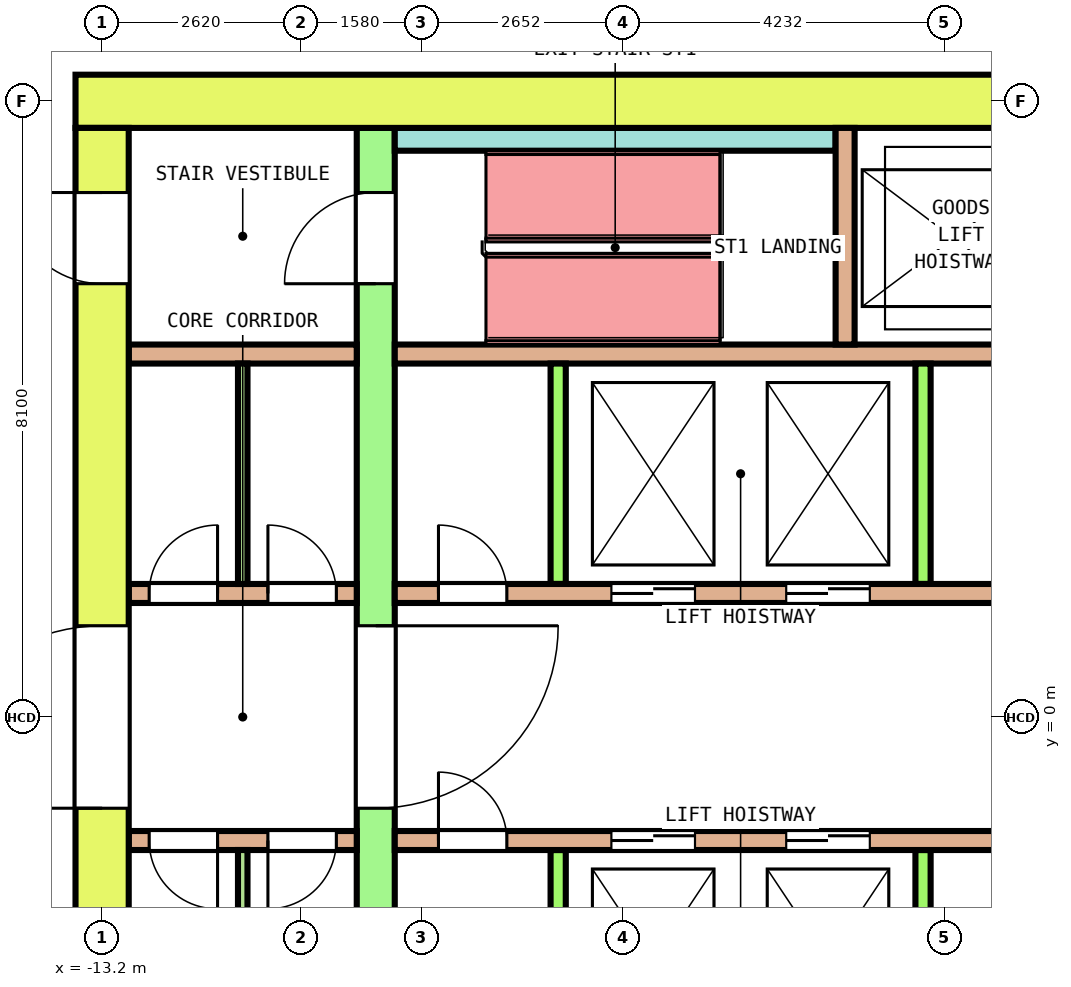
"""IFC4 building model, lengths in metres.
Left out: names, types, materials, properties, quantities, classifications, styles, units other than length and angle.
Written with IfcOpenShell. Run it as: python <this file> out.ifc"""

import sys

from ifc_helpers import new_model, si_unit, direction, frame, frame_2d, origin, place, context, subcontext, project, spatial, rectangle, extrude, element, fill, save


model = new_model("IFC4")
c1 = context("Model", 3, precision=1e-05, world=origin(), true_north=direction((0.0, 1.0)))
c2 = subcontext(c1, "Body", "Model", "MODEL_VIEW")
j1 = project(units=[si_unit("LENGTHUNIT", "METRE"), si_unit("PLANEANGLEUNIT", "RADIAN")], contexts=[c1])
p1 = place(None, origin())
s1 = spatial("IfcSite", under=j1, at=p1, CompositionType="ELEMENT")
p2 = place(p1, origin())
s2 = spatial("IfcBuilding", under=s1, at=p2, CompositionType="ELEMENT")
p3 = place(p2, frame((0.0, 0.0, 145.2)))
s3 = spatial("IfcBuildingStorey", under=s2, at=p3, CompositionType="ELEMENT", Elevation=145.2)
p4 = place(p3, frame((-13.55, 8.1, 0.0), z_axis=(0.0, 0.0, 1.0), x_axis=(1.0, 0.0, 0.0)))
e1 = element("IfcWall", 1, at=p4, inside=s3, PredefinedType="SHEAR", context=c2, shape_type="SweptSolid", body=[
    extrude(rectangle(XDim=27.1, YDim=0.7, at=frame_2d((13.55, 0.0))), origin(), (0.0, 0.0, 1.0), 4.1),
])
p5 = place(p4, frame((14.475, 0.0, 0.0)))
e2 = element("IfcOpeningElement", 2, at=p5, cuts=e1, PredefinedType="OPENING", context=c2, shape_type="SweptSolid", body=[
    extrude(rectangle(XDim=1.4, YDim=2.1, at=frame_2d((0.7, 1.05))), frame((0.0, 0.36, 0.0), z_axis=(0.0, -1.0, 0.0), x_axis=(1.0, 0.0, 0.0)), (0.0, 0.0, 1.0), 0.72),
])
p6 = place(p3, frame((-13.2, -7.75, 0.0), z_axis=(0.0, 0.0, 1.0), x_axis=(0.0, 1.0, 0.0)))
e3 = element("IfcWall", 3, at=p6, inside=s3, PredefinedType="SHEAR", context=c2, shape_type="SweptSolid", body=[
    extrude(rectangle(XDim=15.5, YDim=0.7, at=frame_2d((7.75, 0.0))), origin(), (0.0, 0.0, 1.0), 4.1),
])
p7 = place(p6, frame((6.55, 0.0, 0.0)))
e4 = element("IfcOpeningElement", 4, at=p7, cuts=e3, PredefinedType="OPENING", context=c2, shape_type="SweptSolid", body=[
    extrude(rectangle(XDim=2.4, YDim=2.1, at=frame_2d((1.2, 1.05))), frame((0.0, 0.36, 0.0), z_axis=(0.0, -1.0, 0.0), x_axis=(1.0, 0.0, 0.0)), (0.0, 0.0, 1.0), 0.72),
])
p8 = place(p6, frame((13.45, 0.0, 0.0)))
e5 = element("IfcOpeningElement", 5, at=p8, cuts=e3, PredefinedType="OPENING", context=c2, shape_type="SweptSolid", body=[
    extrude(rectangle(XDim=1.2, YDim=2.1, at=frame_2d((0.6, 1.05))), frame((0.0, 0.36, 0.0), z_axis=(0.0, -1.0, 0.0), x_axis=(1.0, 0.0, 0.0)), (0.0, 0.0, 1.0), 0.72),
])
p9 = place(p6, frame((0.85, 0.0, 0.0)))
e6 = element("IfcOpeningElement", 6, at=p9, cuts=e3, PredefinedType="OPENING", context=c2, shape_type="SweptSolid", body=[
    extrude(rectangle(XDim=1.2, YDim=2.1, at=frame_2d((0.6, 1.05))), frame((0.0, 0.36, 0.0), z_axis=(0.0, -1.0, 0.0), x_axis=(1.0, 0.0, 0.0)), (0.0, 0.0, 1.0), 0.72),
])
p10 = place(p3, frame((-9.6, -7.75, 0.0), z_axis=(0.0, 0.0, 1.0), x_axis=(0.0, 1.0, 0.0)))
e7 = element("IfcWall", 7, at=p10, inside=s3, PredefinedType="SHEAR", context=c2, shape_type="SweptSolid", body=[
    extrude(rectangle(XDim=15.5, YDim=0.5, at=frame_2d((7.75, 0.0))), origin(), (0.0, 0.0, 1.0), 4.1),
])
p11 = place(p10, frame((6.55, 0.0, 0.0)))
e8 = element("IfcOpeningElement", 8, at=p11, cuts=e7, PredefinedType="OPENING", context=c2, shape_type="SweptSolid", body=[
    extrude(rectangle(XDim=2.4, YDim=2.1, at=frame_2d((1.2, 1.05))), frame((0.0, 0.26, 0.0), z_axis=(0.0, -1.0, 0.0), x_axis=(1.0, 0.0, 0.0)), (0.0, 0.0, 1.0), 0.52),
])
p12 = place(p10, frame((13.45, 0.0, 0.0)))
e9 = element("IfcOpeningElement", 9, at=p12, cuts=e7, PredefinedType="OPENING", context=c2, shape_type="SweptSolid", body=[
    extrude(rectangle(XDim=1.2, YDim=2.1, at=frame_2d((0.6, 1.05))), frame((0.0, 0.26, 0.0), z_axis=(0.0, -1.0, 0.0), x_axis=(1.0, 0.0, 0.0)), (0.0, 0.0, 1.0), 0.52),
])
p13 = place(p10, frame((0.85, 0.0, 0.0)))
e10 = element("IfcOpeningElement", 10, at=p13, cuts=e7, PredefinedType="OPENING", context=c2, shape_type="SweptSolid", body=[
    extrude(rectangle(XDim=1.2, YDim=2.1, at=frame_2d((0.6, 1.05))), frame((0.0, 0.26, 0.0), z_axis=(0.0, -1.0, 0.0), x_axis=(1.0, 0.0, 0.0)), (0.0, 0.0, 1.0), 0.52),
])
p14 = place(p3, frame((-12.85, 1.625, 0.0), z_axis=(0.0, 0.0, 1.0), x_axis=(1.0, 0.0, 0.0)))
e11 = element("IfcWall", 11, at=p14, inside=s3, PredefinedType="SOLIDWALL", context=c2, shape_type="SweptSolid", body=[
    extrude(rectangle(XDim=3.0, YDim=0.25, at=frame_2d((1.5, 0.0))), origin(), (0.0, 0.0, 1.0), 4.1),
])
p15 = place(p14, frame((0.269, 0.0, 0.0)))
e12 = element("IfcOpeningElement", 12, at=p15, cuts=e11, PredefinedType="OPENING", context=c2, shape_type="SweptSolid", body=[
    extrude(rectangle(XDim=0.9, YDim=2.1, at=frame_2d((0.45, 1.05))), frame((0.0, 0.135, 0.0), z_axis=(0.0, -1.0, 0.0), x_axis=(1.0, 0.0, 0.0)), (0.0, 0.0, 1.0), 0.27),
])
p16 = place(p14, frame((1.831, 0.0, 0.0)))
e13 = element("IfcOpeningElement", 13, at=p16, cuts=e11, PredefinedType="OPENING", context=c2, shape_type="SweptSolid", body=[
    extrude(rectangle(XDim=0.9, YDim=2.1, at=frame_2d((0.45, 1.05))), frame((0.0, 0.135, 0.0), z_axis=(0.0, -1.0, 0.0), x_axis=(1.0, 0.0, 0.0)), (0.0, 0.0, 1.0), 0.27),
])
p17 = place(p3, frame((-9.35, 1.625, 0.0), z_axis=(0.0, 0.0, 1.0), x_axis=(1.0, 0.0, 0.0)))
e14 = element("IfcWall", 14, at=p17, inside=s3, PredefinedType="SOLIDWALL", context=c2, shape_type="SweptSolid", body=[
    extrude(rectangle(XDim=18.7, YDim=0.25, at=frame_2d((9.35, 0.0))), origin(), (0.0, 0.0, 1.0), 4.1),
])
p18 = place(p17, frame((2.85, 0.0, 0.0)))
e15 = element("IfcOpeningElement", 15, at=p18, cuts=e14, PredefinedType="OPENING", context=c2, shape_type="SweptSolid", body=[
    extrude(rectangle(XDim=1.1, YDim=2.1, at=frame_2d((0.55, 1.05))), frame((0.0, 0.135, 0.0), z_axis=(0.0, -1.0, 0.0), x_axis=(1.0, 0.0, 0.0)), (0.0, 0.0, 1.0), 0.27),
])
p19 = place(p17, frame((5.15, 0.0, 0.0)))
e16 = element("IfcOpeningElement", 16, at=p19, cuts=e14, PredefinedType="OPENING", context=c2, shape_type="SweptSolid", body=[
    extrude(rectangle(XDim=1.1, YDim=2.1, at=frame_2d((0.55, 1.05))), frame((0.0, 0.135, 0.0), z_axis=(0.0, -1.0, 0.0), x_axis=(1.0, 0.0, 0.0)), (0.0, 0.0, 1.0), 0.27),
])
p20 = place(p17, frame((14.8, 0.0, 0.0)))
e17 = element("IfcOpeningElement", 17, at=p20, cuts=e14, PredefinedType="OPENING", context=c2, shape_type="SweptSolid", body=[
    extrude(rectangle(XDim=1.1, YDim=2.1, at=frame_2d((0.55, 1.05))), frame((0.0, 0.135, 0.0), z_axis=(0.0, -1.0, 0.0), x_axis=(1.0, 0.0, 0.0)), (0.0, 0.0, 1.0), 0.27),
])
p21 = place(p17, frame((0.575, 0.0, 0.0)))
e18 = element("IfcOpeningElement", 18, at=p21, cuts=e14, PredefinedType="OPENING", context=c2, shape_type="SweptSolid", body=[
    extrude(rectangle(XDim=0.9, YDim=2.1, at=frame_2d((0.45, 1.05))), frame((0.0, 0.135, 0.0), z_axis=(0.0, -1.0, 0.0), x_axis=(1.0, 0.0, 0.0)), (0.0, 0.0, 1.0), 0.27),
])
p22 = place(p17, frame((17.225, 0.0, 0.0)))
e19 = element("IfcOpeningElement", 19, at=p22, cuts=e14, PredefinedType="OPENING", context=c2, shape_type="SweptSolid", body=[
    extrude(rectangle(XDim=0.9, YDim=2.1, at=frame_2d((0.45, 1.05))), frame((0.0, 0.135, 0.0), z_axis=(0.0, -1.0, 0.0), x_axis=(1.0, 0.0, 0.0)), (0.0, 0.0, 1.0), 0.27),
])
p23 = place(p3, frame((-12.85, 4.775, 0.0), z_axis=(0.0, 0.0, 1.0), x_axis=(1.0, 0.0, 0.0)))
e20 = element("IfcWall", 20, at=p23, inside=s3, PredefinedType="SOLIDWALL", context=c2, shape_type="SweptSolid", body=[
    extrude(rectangle(XDim=3.0, YDim=0.25, at=frame_2d((1.5, 0.0))), origin(), (0.0, 0.0, 1.0), 4.1),
])
p24 = place(p3, frame((-9.35, 4.775, 0.0), z_axis=(0.0, 0.0, 1.0), x_axis=(1.0, 0.0, 0.0)))
e21 = element("IfcWall", 21, at=p24, inside=s3, PredefinedType="SOLIDWALL", context=c2, shape_type="SweptSolid", body=[
    extrude(rectangle(XDim=18.7, YDim=0.25, at=frame_2d((9.35, 0.0))), origin(), (0.0, 0.0, 1.0), 4.1),
])
for number, where, z_axis, x_axis in (
    (22, (-7.2, 1.75, 0.0), (0.0, 0.0, 1.0), (0.0, 1.0, 0.0)),
    (23, (-2.4, 1.75, 0.0), (0.0, 0.0, 1.0), (0.0, 1.0, 0.0)),
):
    element("IfcWall", number, at=place(p3, frame(where, z_axis=z_axis, x_axis=x_axis)), inside=s3, PredefinedType="SOLIDWALL", context=c2, shape_type="SweptSolid", body=[
        extrude(rectangle(XDim=2.9, YDim=0.2, at=frame_2d((1.45, 0.0))), origin(), (0.0, 0.0, 1.0), 4.1),
    ])
p25 = place(p3, frame((-12.85, -1.625, 0.0), z_axis=(0.0, 0.0, 1.0), x_axis=(1.0, 0.0, 0.0)))
e24 = element("IfcWall", 24, at=p25, inside=s3, PredefinedType="SOLIDWALL", context=c2, shape_type="SweptSolid", body=[
    extrude(rectangle(XDim=3.0, YDim=0.25, at=frame_2d((1.5, 0.0))), origin(), (0.0, 0.0, 1.0), 4.1),
])
p26 = place(p25, frame((0.269, 0.0, 0.0)))
e25 = element("IfcOpeningElement", 25, at=p26, cuts=e24, PredefinedType="OPENING", context=c2, shape_type="SweptSolid", body=[
    extrude(rectangle(XDim=0.9, YDim=2.1, at=frame_2d((0.45, 1.05))), frame((0.0, 0.135, 0.0), z_axis=(0.0, -1.0, 0.0), x_axis=(1.0, 0.0, 0.0)), (0.0, 0.0, 1.0), 0.27),
])
p27 = place(p25, frame((1.831, 0.0, 0.0)))
e26 = element("IfcOpeningElement", 26, at=p27, cuts=e24, PredefinedType="OPENING", context=c2, shape_type="SweptSolid", body=[
    extrude(rectangle(XDim=0.9, YDim=2.1, at=frame_2d((0.45, 1.05))), frame((0.0, 0.135, 0.0), z_axis=(0.0, -1.0, 0.0), x_axis=(1.0, 0.0, 0.0)), (0.0, 0.0, 1.0), 0.27),
])
p28 = place(p3, frame((-9.35, -1.625, 0.0), z_axis=(0.0, 0.0, 1.0), x_axis=(1.0, 0.0, 0.0)))
e27 = element("IfcWall", 27, at=p28, inside=s3, PredefinedType="SOLIDWALL", context=c2, shape_type="SweptSolid", body=[
    extrude(rectangle(XDim=18.7, YDim=0.25, at=frame_2d((9.35, 0.0))), origin(), (0.0, 0.0, 1.0), 4.1),
])
p29 = place(p28, frame((2.85, 0.0, 0.0)))
e28 = element("IfcOpeningElement", 28, at=p29, cuts=e27, PredefinedType="OPENING", context=c2, shape_type="SweptSolid", body=[
    extrude(rectangle(XDim=1.1, YDim=2.1, at=frame_2d((0.55, 1.05))), frame((0.0, 0.135, 0.0), z_axis=(0.0, -1.0, 0.0), x_axis=(1.0, 0.0, 0.0)), (0.0, 0.0, 1.0), 0.27),
])
p30 = place(p28, frame((5.15, 0.0, 0.0)))
e29 = element("IfcOpeningElement", 29, at=p30, cuts=e27, PredefinedType="OPENING", context=c2, shape_type="SweptSolid", body=[
    extrude(rectangle(XDim=1.1, YDim=2.1, at=frame_2d((0.55, 1.05))), frame((0.0, 0.135, 0.0), z_axis=(0.0, -1.0, 0.0), x_axis=(1.0, 0.0, 0.0)), (0.0, 0.0, 1.0), 0.27),
])
p31 = place(p28, frame((14.8, 0.0, 0.0)))
e30 = element("IfcOpeningElement", 30, at=p31, cuts=e27, PredefinedType="OPENING", context=c2, shape_type="SweptSolid", body=[
    extrude(rectangle(XDim=1.1, YDim=2.1, at=frame_2d((0.55, 1.05))), frame((0.0, 0.135, 0.0), z_axis=(0.0, -1.0, 0.0), x_axis=(1.0, 0.0, 0.0)), (0.0, 0.0, 1.0), 0.27),
])
p32 = place(p28, frame((0.575, 0.0, 0.0)))
e31 = element("IfcOpeningElement", 31, at=p32, cuts=e27, PredefinedType="OPENING", context=c2, shape_type="SweptSolid", body=[
    extrude(rectangle(XDim=0.9, YDim=2.1, at=frame_2d((0.45, 1.05))), frame((0.0, 0.135, 0.0), z_axis=(0.0, -1.0, 0.0), x_axis=(1.0, 0.0, 0.0)), (0.0, 0.0, 1.0), 0.27),
])
p33 = place(p28, frame((17.225, 0.0, 0.0)))
e32 = element("IfcOpeningElement", 32, at=p33, cuts=e27, PredefinedType="OPENING", context=c2, shape_type="SweptSolid", body=[
    extrude(rectangle(XDim=0.9, YDim=2.1, at=frame_2d((0.45, 1.05))), frame((0.0, 0.135, 0.0), z_axis=(0.0, -1.0, 0.0), x_axis=(1.0, 0.0, 0.0)), (0.0, 0.0, 1.0), 0.27),
])
for number, where, z_axis, x_axis in (
    (33, (-7.2, -4.65, 0.0), (0.0, 0.0, 1.0), (0.0, 1.0, 0.0)),
    (34, (-2.4, -4.65, 0.0), (0.0, 0.0, 1.0), (0.0, 1.0, 0.0)),
):
    element("IfcWall", number, at=place(p3, frame(where, z_axis=z_axis, x_axis=x_axis)), inside=s3, PredefinedType="SOLIDWALL", context=c2, shape_type="SweptSolid", body=[
        extrude(rectangle(XDim=2.9, YDim=0.2, at=frame_2d((1.45, 0.0))), origin(), (0.0, 0.0, 1.0), 4.1),
    ])
p34 = place(p3, frame((-9.35, 7.6, 0.0), z_axis=(0.0, 0.0, 1.0), x_axis=(1.0, 0.0, 0.0)))
e35 = element("IfcWall", 35, at=p34, inside=s3, PredefinedType="SOLIDWALL", context=c2, shape_type="SweptSolid", body=[
    extrude(rectangle(XDim=5.8, YDim=0.3, at=frame_2d((2.9, 0.0))), origin(), (0.0, 0.0, 1.0), 4.1),
])
p35 = place(p3, frame((-3.425, 4.9, 0.0), z_axis=(0.0, 0.0, 1.0), x_axis=(0.0, 1.0, 0.0)))
e36 = element("IfcWall", 36, at=p35, inside=s3, PredefinedType="SOLIDWALL", context=c2, shape_type="SweptSolid", body=[
    extrude(rectangle(XDim=2.85, YDim=0.25, at=frame_2d((1.425, 0.0))), origin(), (0.0, 0.0, 1.0), 4.1),
])
for number, where, z_axis, x_axis in (
    (37, (-11.35, 1.75, 0.0), (0.0, 0.0, 1.0), (0.0, 1.0, 0.0)),
    (38, (-11.35, -4.65, 0.0), (0.0, 0.0, 1.0), (0.0, 1.0, 0.0)),
):
    element("IfcWall", number, at=place(p3, frame(where, z_axis=z_axis, x_axis=x_axis)), inside=s3, PredefinedType="PARTITIONING", context=c2, shape_type="SweptSolid", body=[
        extrude(rectangle(XDim=2.9, YDim=0.125, at=frame_2d((1.45, 0.0))), origin(), (0.0, 0.0, 1.0), 4.1),
    ])
p36 = place(p18, origin())
e39 = element("IfcDoor", 39, at=p36, inside=s3, OperationType="DOUBLE_DOOR_SLIDING", PredefinedType="DOOR", context=c2, shape_type="SweptSolid", body=[
    extrude(rectangle(XDim=1.1, YDim=2.1, at=frame_2d((0.55, 1.05))), frame((0.0, 0.075, 0.0), z_axis=(0.0, -1.0, 0.0), x_axis=(1.0, 0.0, 0.0)), (0.0, 0.0, 1.0), 0.15),
])
fill(e15, e39)
p37 = place(p19, origin())
e40 = element("IfcDoor", 40, at=p37, inside=s3, OperationType="DOUBLE_DOOR_SLIDING", PredefinedType="DOOR", context=c2, shape_type="SweptSolid", body=[
    extrude(rectangle(XDim=1.1, YDim=2.1, at=frame_2d((0.55, 1.05))), frame((0.0, 0.075, 0.0), z_axis=(0.0, -1.0, 0.0), x_axis=(1.0, 0.0, 0.0)), (0.0, 0.0, 1.0), 0.15),
])
fill(e16, e40)
p38 = place(p29, origin())
e41 = element("IfcDoor", 41, at=p38, inside=s3, OperationType="DOUBLE_DOOR_SLIDING", PredefinedType="DOOR", context=c2, shape_type="SweptSolid", body=[
    extrude(rectangle(XDim=1.1, YDim=2.1, at=frame_2d((0.55, 1.05))), frame((0.0, 0.075, 0.0), z_axis=(0.0, -1.0, 0.0), x_axis=(1.0, 0.0, 0.0)), (0.0, 0.0, 1.0), 0.15),
])
fill(e28, e41)
p39 = place(p30, origin())
e42 = element("IfcDoor", 42, at=p39, inside=s3, OperationType="DOUBLE_DOOR_SLIDING", PredefinedType="DOOR", context=c2, shape_type="SweptSolid", body=[
    extrude(rectangle(XDim=1.1, YDim=2.1, at=frame_2d((0.55, 1.05))), frame((0.0, 0.075, 0.0), z_axis=(0.0, -1.0, 0.0), x_axis=(1.0, 0.0, 0.0)), (0.0, 0.0, 1.0), 0.15),
])
fill(e29, e42)
p40 = place(p11, origin())
e43 = element("IfcDoor", 43, at=p40, inside=s3, OperationType="DOUBLE_DOOR_SINGLE_SWING", PredefinedType="DOOR", context=c2, shape_type="SweptSolid", body=[
    extrude(rectangle(XDim=2.4, YDim=2.1, at=frame_2d((1.2, 1.05))), frame((0.0, 0.2, 0.0), z_axis=(0.0, -1.0, 0.0), x_axis=(1.0, 0.0, 0.0)), (0.0, 0.0, 1.0), 0.4),
])
fill(e8, e43)
p41 = place(p7, origin())
e44 = element("IfcDoor", 44, at=p41, inside=s3, OperationType="DOUBLE_DOOR_SINGLE_SWING", PredefinedType="DOOR", context=c2, shape_type="SweptSolid", body=[
    extrude(rectangle(XDim=2.4, YDim=2.1, at=frame_2d((1.2, 1.05))), frame((0.0, 0.3, 0.0), z_axis=(0.0, -1.0, 0.0), x_axis=(1.0, 0.0, 0.0)), (0.0, 0.0, 1.0), 0.6),
])
fill(e4, e44)
p42 = place(p12, origin())
e45 = element("IfcDoor", 45, at=p42, inside=s3, OperationType="SINGLE_SWING_RIGHT", PredefinedType="DOOR", context=c2, shape_type="SweptSolid", body=[
    extrude(rectangle(XDim=1.2, YDim=2.1, at=frame_2d((0.6, 1.05))), frame((0.0, 0.2, 0.0), z_axis=(0.0, -1.0, 0.0), x_axis=(1.0, 0.0, 0.0)), (0.0, 0.0, 1.0), 0.4),
])
fill(e9, e45)
p43 = place(p8, origin())
e46 = element("IfcDoor", 46, at=p43, inside=s3, OperationType="SINGLE_SWING_LEFT", PredefinedType="DOOR", context=c2, shape_type="SweptSolid", body=[
    extrude(rectangle(XDim=1.2, YDim=2.1, at=frame_2d((0.6, 1.05))), frame((0.0, 0.3, 0.0), z_axis=(0.0, -1.0, 0.0), x_axis=(1.0, 0.0, 0.0)), (0.0, 0.0, 1.0), 0.6),
])
fill(e5, e46)
p44 = place(p15, origin())
e47 = element("IfcDoor", 47, at=p44, inside=s3, OperationType="SINGLE_SWING_LEFT", PredefinedType="DOOR", context=c2, shape_type="SweptSolid", body=[
    extrude(rectangle(XDim=0.9, YDim=2.1, at=frame_2d((0.45, 1.05))), frame((0.0, 0.075, 0.0), z_axis=(0.0, -1.0, 0.0), x_axis=(1.0, 0.0, 0.0)), (0.0, 0.0, 1.0), 0.15),
])
fill(e12, e47)
p45 = place(p16, origin())
e48 = element("IfcDoor", 48, at=p45, inside=s3, OperationType="SINGLE_SWING_RIGHT", PredefinedType="DOOR", context=c2, shape_type="SweptSolid", body=[
    extrude(rectangle(XDim=0.9, YDim=2.1, at=frame_2d((0.45, 1.05))), frame((0.0, 0.075, 0.0), z_axis=(0.0, -1.0, 0.0), x_axis=(1.0, 0.0, 0.0)), (0.0, 0.0, 1.0), 0.15),
])
fill(e13, e48)
p46 = place(p21, origin())
e49 = element("IfcDoor", 49, at=p46, inside=s3, OperationType="SINGLE_SWING_LEFT", PredefinedType="DOOR", context=c2, shape_type="SweptSolid", body=[
    extrude(rectangle(XDim=0.9, YDim=2.1, at=frame_2d((0.45, 1.05))), frame((0.0, 0.075, 0.0), z_axis=(0.0, -1.0, 0.0), x_axis=(1.0, 0.0, 0.0)), (0.0, 0.0, 1.0), 0.15),
])
fill(e18, e49)
p47 = place(p26, origin())
e50 = element("IfcDoor", 50, at=p47, inside=s3, OperationType="SINGLE_SWING_RIGHT", PredefinedType="DOOR", context=c2, shape_type="SweptSolid", body=[
    extrude(rectangle(XDim=0.9, YDim=2.1, at=frame_2d((0.45, 1.05))), frame((0.0, 0.075, 0.0), z_axis=(0.0, -1.0, 0.0), x_axis=(1.0, 0.0, 0.0)), (0.0, 0.0, 1.0), 0.15),
])
fill(e25, e50)
p48 = place(p27, origin())
e51 = element("IfcDoor", 51, at=p48, inside=s3, OperationType="SINGLE_SWING_LEFT", PredefinedType="DOOR", context=c2, shape_type="SweptSolid", body=[
    extrude(rectangle(XDim=0.9, YDim=2.1, at=frame_2d((0.45, 1.05))), frame((0.0, 0.075, 0.0), z_axis=(0.0, -1.0, 0.0), x_axis=(1.0, 0.0, 0.0)), (0.0, 0.0, 1.0), 0.15),
])
fill(e26, e51)
p49 = place(p32, origin())
e52 = element("IfcDoor", 52, at=p49, inside=s3, OperationType="SINGLE_SWING_RIGHT", PredefinedType="DOOR", context=c2, shape_type="SweptSolid", body=[
    extrude(rectangle(XDim=0.9, YDim=2.1, at=frame_2d((0.45, 1.05))), frame((0.0, 0.075, 0.0), z_axis=(0.0, -1.0, 0.0), x_axis=(1.0, 0.0, 0.0)), (0.0, 0.0, 1.0), 0.15),
])
fill(e31, e52)
save(model, sys.argv[1])
